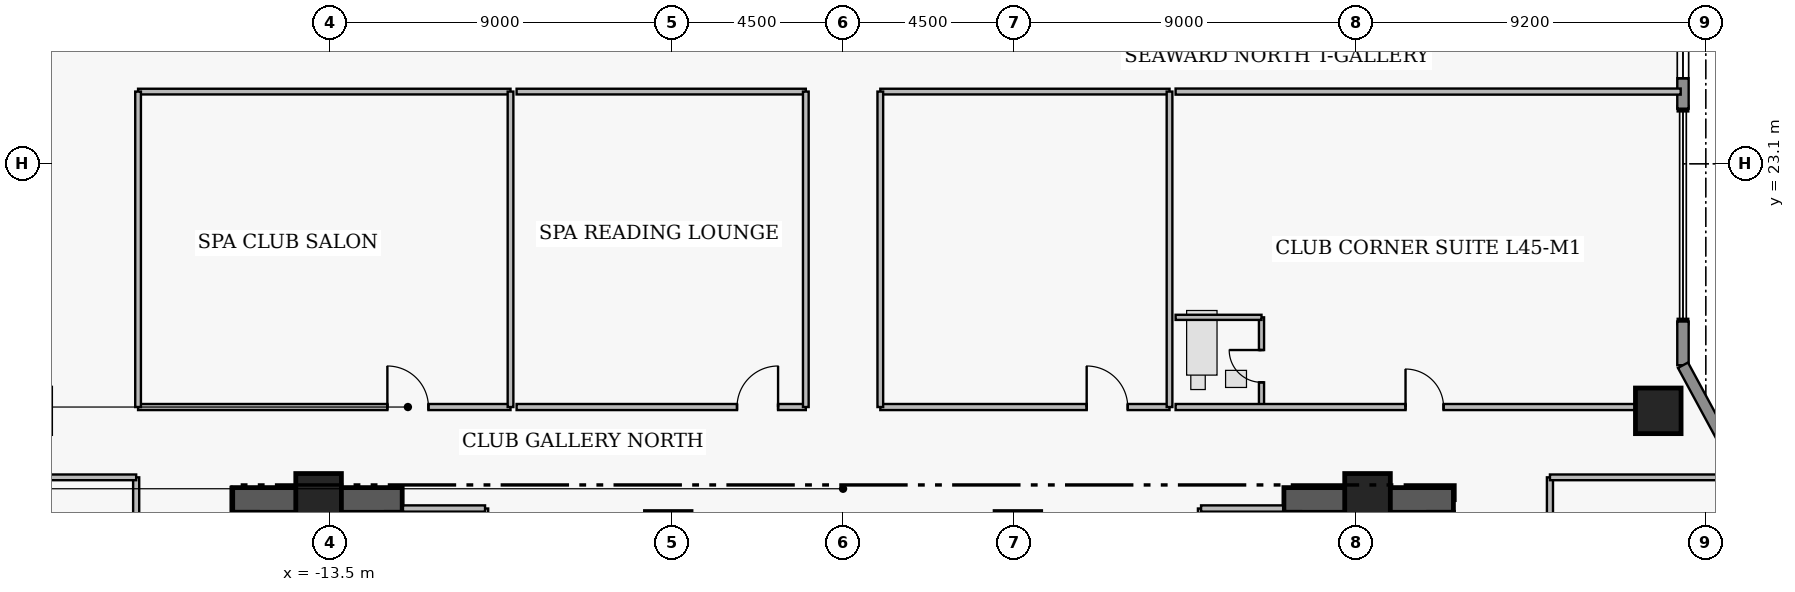
"""IFC4 building model, lengths in metres.
Left out: names, types, materials, properties, quantities, classifications, styles, units other than length and angle.
Written with IfcOpenShell. Run it as: python <this file> out.ifc"""

import sys

from ifc_helpers import new_model, si_unit, direction, frame, frame_2d, origin, origin_2d, place, context, subcontext, project, spatial, rectangle, extrude, element, fill, save


model = new_model("IFC4")
c1 = context("Model", 3, precision=1e-05, world=origin(), true_north=direction((0.0, 1.0)))
c2 = subcontext(c1, "Body", "Model", "MODEL_VIEW")
j1 = project(units=[si_unit("LENGTHUNIT", "METRE"), si_unit("PLANEANGLEUNIT", "RADIAN")], contexts=[c1])
p1 = place(None, origin())
s1 = spatial("IfcSite", under=j1, at=p1, CompositionType="ELEMENT")
p2 = place(p1, origin())
s2 = spatial("IfcBuilding", under=s1, at=p2, CompositionType="ELEMENT")
p3 = place(p2, frame((0.0, 0.0, 181.15)))
s3 = spatial("IfcBuildingStorey", under=s2, at=p3, CompositionType="ELEMENT", Elevation=181.15)
for number, where, z_axis, x_axis in (
    (1, (-16.06, 14.255, 0.0), (0.0, 0.0, 1.0), (1.0, 0.0, 0.0)),
    (2, (11.6, 14.255, 0.0), (0.0, 0.0, 1.0), (1.0, 0.0, 0.0)),
):
    element("IfcWall", number, at=place(p3, frame(where, z_axis=z_axis, x_axis=x_axis)), inside=s3, PredefinedType="SHEAR", context=c2, shape_type="SweptSolid", body=[
        extrude(rectangle(XDim=4.46, YDim=0.65, at=frame_2d((2.23, 0.0))), origin(), (0.0, 0.0, 1.0), 3.56),
    ])
for number, where, z_axis, x_axis in (
    (3, (-13.8, 14.35, 0.0), (0.0, 0.0, 1.0), (1.0, 0.0, 0.0)),
    (4, (-4.6, 13.35, 0.0), (0.0, 0.0, 1.0), (1.0, 0.0, 0.0)),
    (5, (4.6, 13.35, 0.0), (0.0, 0.0, 1.0), (1.0, 0.0, 0.0)),
    (6, (13.8, 14.35, 0.0), (0.0, 0.0, 1.0), (1.0, 0.0, 0.0)),
    (7, (21.45, 16.6, 0.0), (0.0, 0.0, 1.0), (1.0, 0.0, 0.0)),
):
    element("IfcColumn", number, at=place(p3, frame(where, z_axis=z_axis, x_axis=x_axis)), inside=s3, PredefinedType="COLUMN", context=c2, shape_type="SweptSolid", body=[
        extrude(rectangle(XDim=1.2, YDim=1.2, at=origin_2d()), origin(), (0.0, 0.0, 1.0), 3.75),
    ])
p4 = place(p3, frame((22.1, 30.2, 0.0), z_axis=(0.0, 0.0, 1.0), x_axis=(0.0, -1.0, 0.0)))
e8 = element("IfcWall", 8, at=p4, inside=s3, PredefinedType="STANDARD", context=c2, shape_type="SweptSolid", body=[
    extrude(rectangle(XDim=5.65, YDim=0.3, at=frame_2d((2.825, 0.0))), origin(), (0.0, 0.0, 1.0), 3.53),
])
p5 = place(p4, frame((0.935, 0.0, 0.85)))
e9 = element("IfcOpeningElement", 9, at=p5, cuts=e8, PredefinedType="OPENING", context=c2, shape_type="SweptSolid", body=[
    extrude(rectangle(XDim=1.6, YDim=1.8, at=frame_2d((0.8, 0.9))), frame((0.0, 0.16, 0.0), z_axis=(0.0, -1.0, 0.0), x_axis=(1.0, 0.0, 0.0)), (0.0, 0.0, 1.0), 0.32),
])
p6 = place(p4, frame((3.7, 0.0, 0.95)))
e10 = element("IfcOpeningElement", 10, at=p6, cuts=e8, PredefinedType="OPENING", context=c2, shape_type="SweptSolid", body=[
    extrude(rectangle(XDim=1.15, YDim=1.55, at=frame_2d((0.575, 0.775))), frame((0.0, 0.16, 0.0), z_axis=(0.0, -1.0, 0.0), x_axis=(1.0, 0.0, 0.0)), (0.0, 0.0, 1.0), 0.32),
])
p7 = place(p3, frame((22.1, 18.95, 0.0), z_axis=(0.0, 0.0, 1.0), x_axis=(0.0, -1.0, 0.0)))
e11 = element("IfcWall", 11, at=p7, inside=s3, PredefinedType="STANDARD", context=c2, shape_type="SweptSolid", body=[
    extrude(rectangle(XDim=1.15, YDim=0.3, at=frame_2d((0.575, 0.0))), origin(), (0.0, 0.0, 1.0), 3.53),
])
p8 = place(p3, frame((22.1, 17.8, 0.0), z_axis=(0.0, 0.0, 1.0), x_axis=(0.476258655584, -0.879305233114, 0.0)))
e12 = element("IfcWall", 12, at=p8, inside=s3, PredefinedType="STANDARD", context=c2, shape_type="SweptSolid", body=[
    extrude(rectangle(XDim=5.459, YDim=0.3, at=frame_2d((2.729, 0.0))), origin(), (0.0, 0.0, 1.0), 3.53),
])
p9 = place(p3, frame((-18.55, 16.7, 0.0), z_axis=(0.0, 0.0, 1.0), x_axis=(1.0, 0.0, 0.0)))
e13 = element("IfcWall", 13, at=p9, inside=s3, PredefinedType="PARTITIONING", context=c2, shape_type="SweptSolid", body=[
    extrude(rectangle(XDim=9.8, YDim=0.16, at=frame_2d((4.9, 0.0))), origin(), (0.0, 0.0, 1.0), 3.124),
])
p10 = place(p9, frame((6.56, 0.0, 0.0)))
e14 = element("IfcOpeningElement", 14, at=p10, cuts=e13, PredefinedType="OPENING", context=c2, shape_type="SweptSolid", body=[
    extrude(rectangle(XDim=1.08, YDim=2.18, at=frame_2d((0.54, 1.09))), frame((0.0, 0.09, 0.0), z_axis=(0.0, -1.0, 0.0), x_axis=(1.0, 0.0, 0.0)), (0.0, 0.0, 1.0), 0.18),
])
p11 = place(p3, frame((-8.59, 16.7, 0.0), z_axis=(0.0, 0.0, 1.0), x_axis=(1.0, 0.0, 0.0)))
e15 = element("IfcWall", 15, at=p11, inside=s3, PredefinedType="PARTITIONING", context=c2, shape_type="SweptSolid", body=[
    extrude(rectangle(XDim=7.61, YDim=0.16, at=frame_2d((3.805, 0.0))), origin(), (0.0, 0.0, 1.0), 3.124),
])
p12 = place(p11, frame((5.8, 0.0, 0.0)))
e16 = element("IfcOpeningElement", 16, at=p12, cuts=e15, PredefinedType="OPENING", context=c2, shape_type="SweptSolid", body=[
    extrude(rectangle(XDim=1.08, YDim=2.18, at=frame_2d((0.54, 1.09))), frame((0.0, 0.09, 0.0), z_axis=(0.0, -1.0, 0.0), x_axis=(1.0, 0.0, 0.0)), (0.0, 0.0, 1.0), 0.18),
])
p13 = place(p3, frame((0.98, 16.7, 0.0), z_axis=(0.0, 0.0, 1.0), x_axis=(1.0, 0.0, 0.0)))
e17 = element("IfcWall", 17, at=p13, inside=s3, PredefinedType="PARTITIONING", context=c2, shape_type="SweptSolid", body=[
    extrude(rectangle(XDim=7.61, YDim=0.16, at=frame_2d((3.805, 0.0))), origin(), (0.0, 0.0, 1.0), 3.124),
])
p14 = place(p13, frame((5.43, 0.0, 0.0)))
e18 = element("IfcOpeningElement", 18, at=p14, cuts=e17, PredefinedType="OPENING", context=c2, shape_type="SweptSolid", body=[
    extrude(rectangle(XDim=1.08, YDim=2.18, at=frame_2d((0.54, 1.09))), frame((0.0, 0.09, 0.0), z_axis=(0.0, -1.0, 0.0), x_axis=(1.0, 0.0, 0.0)), (0.0, 0.0, 1.0), 0.18),
])
p15 = place(p3, frame((11.01, 16.7, 0.0), z_axis=(0.0, 0.0, 1.0), x_axis=(0.0, 1.0, 0.0)))
e19 = element("IfcWall", 19, at=p15, inside=s3, PredefinedType="PLUMBINGWALL", context=c2, shape_type="SweptSolid", body=[
    extrude(rectangle(XDim=2.36, YDim=0.135, at=frame_2d((1.18, 0.0))), origin(), (0.0, 0.0, 1.0), 3.53),
])
p16 = place(p15, frame((0.65, 0.0, 0.0)))
e20 = element("IfcOpeningElement", 20, at=p16, cuts=e19, PredefinedType="OPENING", context=c2, shape_type="SweptSolid", body=[
    extrude(rectangle(XDim=0.85, YDim=2.1, at=frame_2d((0.425, 1.05))), frame((0.0, 0.077, 0.0), z_axis=(0.0, -1.0, 0.0), x_axis=(1.0, 0.0, 0.0)), (0.0, 0.0, 1.0), 0.155),
])
p17 = place(p3, frame((8.75, 16.7, 0.0), z_axis=(0.0, 0.0, 1.0), x_axis=(1.0, 0.0, 0.0)))
e21 = element("IfcWall", 21, at=p17, inside=s3, PredefinedType="PARTITIONING", context=c2, shape_type="SweptSolid", body=[
    extrude(rectangle(XDim=13.29, YDim=0.16, at=frame_2d((6.645, 0.0))), origin(), (0.0, 0.0, 1.0), 3.124),
])
p18 = place(p17, frame((6.05, 0.0, 0.0)))
e22 = element("IfcOpeningElement", 22, at=p18, cuts=e21, PredefinedType="OPENING", context=c2, shape_type="SweptSolid", body=[
    extrude(rectangle(XDim=1.0, YDim=2.15, at=frame_2d((0.5, 1.075))), frame((0.0, 0.09, 0.0), z_axis=(0.0, -1.0, 0.0), x_axis=(1.0, 0.0, 0.0)), (0.0, 0.0, 1.0), 0.18),
])
p19 = place(p3, frame((18.6, 7.96, 0.0), z_axis=(0.0, 0.0, 1.0), x_axis=(0.0, 1.0, 0.0)))
e23 = element("IfcWall", 23, at=p19, inside=s3, PredefinedType="PARTITIONING", context=c2, shape_type="SweptSolid", body=[
    extrude(rectangle(XDim=6.89, YDim=0.16, at=frame_2d((3.445, 0.0))), origin(), (0.0, 0.0, 1.0), 3.53),
])
p20 = place(p19, frame((2.985, 0.0, 0.0)))
e24 = element("IfcOpeningElement", 24, at=p20, cuts=e23, PredefinedType="OPENING", context=c2, shape_type="SweptSolid", body=[
    extrude(rectangle(XDim=0.92, YDim=2.12, at=frame_2d((0.46, 1.06))), frame((0.0, 0.09, 0.0), z_axis=(0.0, -1.0, 0.0), x_axis=(1.0, 0.0, 0.0)), (0.0, 0.0, 1.0), 0.18),
])
p21 = place(p3, frame((-18.6, 1.55, 0.0), z_axis=(0.0, 0.0, 1.0), x_axis=(0.0, 1.0, 0.0)))
e25 = element("IfcWall", 25, at=p21, inside=s3, PredefinedType="PARTITIONING", context=c2, shape_type="SweptSolid", body=[
    extrude(rectangle(XDim=13.3, YDim=0.16, at=frame_2d((6.65, 0.0))), origin(), (0.0, 0.0, 1.0), 3.53),
])
p22 = place(p21, frame((6.175, 0.0, 0.0)))
e26 = element("IfcOpeningElement", 26, at=p22, cuts=e25, PredefinedType="OPENING", context=c2, shape_type="SweptSolid", body=[
    extrude(rectangle(XDim=0.95, YDim=2.15, at=frame_2d((0.475, 1.075))), frame((0.0, 0.09, 0.0), z_axis=(0.0, -1.0, 0.0), x_axis=(1.0, 0.0, 0.0)), (0.0, 0.0, 1.0), 0.18),
])
p23 = place(p3, frame((-9.42, 11.07, 0.0), z_axis=(0.0, 0.0, 1.0), x_axis=(0.0, 1.0, 0.0)))
e27 = element("IfcWall", 27, at=p23, inside=s3, PredefinedType="PARTITIONING", context=c2, shape_type="SweptSolid", body=[
    extrude(rectangle(XDim=2.96, YDim=0.165, at=frame_2d((1.48, 0.0))), origin(), (0.0, 0.0, 1.0), 3.53),
])
p24 = place(p3, frame((-11.58, 14.03, 0.0), z_axis=(0.0, 0.0, 1.0), x_axis=(1.0, 0.0, 0.0)))
e28 = element("IfcWall", 28, at=p24, inside=s3, PredefinedType="PARTITIONING", context=c2, shape_type="SweptSolid", body=[
    extrude(rectangle(XDim=2.16, YDim=0.165, at=frame_2d((1.08, 0.0))), origin(), (0.0, 0.0, 1.0), 3.53),
])
p25 = place(p3, frame((9.42, 11.07, 0.0), z_axis=(0.0, 0.0, 1.0), x_axis=(0.0, 1.0, 0.0)))
e29 = element("IfcWall", 29, at=p25, inside=s3, PredefinedType="PARTITIONING", context=c2, shape_type="SweptSolid", body=[
    extrude(rectangle(XDim=2.96, YDim=0.165, at=frame_2d((1.48, 0.0))), origin(), (0.0, 0.0, 1.0), 3.53),
])
p26 = place(p3, frame((9.42, 14.03, 0.0), z_axis=(0.0, 0.0, 1.0), x_axis=(1.0, 0.0, 0.0)))
e30 = element("IfcWall", 30, at=p26, inside=s3, PredefinedType="PARTITIONING", context=c2, shape_type="SweptSolid", body=[
    extrude(rectangle(XDim=2.16, YDim=0.165, at=frame_2d((1.08, 0.0))), origin(), (0.0, 0.0, 1.0), 3.53),
])
p27 = place(p3, frame((-18.55, 25.0, 0.0), z_axis=(0.0, 0.0, 1.0), x_axis=(1.0, 0.0, 0.0)))
e31 = element("IfcWall", 31, at=p27, inside=s3, PredefinedType="PARTITIONING", context=c2, shape_type="SweptSolid", body=[
    extrude(rectangle(XDim=9.8, YDim=0.15, at=frame_2d((4.9, 0.0))), origin(), (0.0, 0.0, 1.0), 3.124),
])
for number, where, z_axis, x_axis in (
    (32, (-18.55, 16.7, 0.0), (0.0, 0.0, 1.0), (0.0, 1.0, 0.0)),
    (33, (-8.75, 16.7, 0.0), (0.0, 0.0, 1.0), (0.0, 1.0, 0.0)),
):
    element("IfcWall", number, at=place(p3, frame(where, z_axis=z_axis, x_axis=x_axis)), inside=s3, PredefinedType="PARTITIONING", context=c2, shape_type="SweptSolid", body=[
        extrude(rectangle(XDim=8.3, YDim=0.15, at=frame_2d((4.15, 0.0))), origin(), (0.0, 0.0, 1.0), 3.53),
    ])
p28 = place(p3, frame((-8.59, 25.0, 0.0), z_axis=(0.0, 0.0, 1.0), x_axis=(1.0, 0.0, 0.0)))
e34 = element("IfcWall", 34, at=p28, inside=s3, PredefinedType="PARTITIONING", context=c2, shape_type="SweptSolid", body=[
    extrude(rectangle(XDim=7.61, YDim=0.15, at=frame_2d((3.805, 0.0))), origin(), (0.0, 0.0, 1.0), 3.124),
])
p29 = place(p3, frame((-0.98, 16.7, 0.0), z_axis=(0.0, 0.0, 1.0), x_axis=(0.0, 1.0, 0.0)))
e35 = element("IfcWall", 35, at=p29, inside=s3, PredefinedType="PARTITIONING", context=c2, shape_type="SweptSolid", body=[
    extrude(rectangle(XDim=8.3, YDim=0.15, at=frame_2d((4.15, 0.0))), origin(), (0.0, 0.0, 1.0), 3.53),
])
p30 = place(p3, frame((0.98, 25.0, 0.0), z_axis=(0.0, 0.0, 1.0), x_axis=(1.0, 0.0, 0.0)))
e36 = element("IfcWall", 36, at=p30, inside=s3, PredefinedType="PARTITIONING", context=c2, shape_type="SweptSolid", body=[
    extrude(rectangle(XDim=7.61, YDim=0.15, at=frame_2d((3.805, 0.0))), origin(), (0.0, 0.0, 1.0), 3.124),
])
for number, where, z_axis, x_axis in (
    (37, (0.98, 16.7, 0.0), (0.0, 0.0, 1.0), (0.0, 1.0, 0.0)),
    (38, (8.59, 16.7, 0.0), (0.0, 0.0, 1.0), (0.0, 1.0, 0.0)),
):
    element("IfcWall", number, at=place(p3, frame(where, z_axis=z_axis, x_axis=x_axis)), inside=s3, PredefinedType="PARTITIONING", context=c2, shape_type="SweptSolid", body=[
        extrude(rectangle(XDim=8.3, YDim=0.15, at=frame_2d((4.15, 0.0))), origin(), (0.0, 0.0, 1.0), 3.53),
    ])
p31 = place(p3, frame((8.75, 19.06, 0.0), z_axis=(0.0, 0.0, 1.0), x_axis=(1.0, 0.0, 0.0)))
e39 = element("IfcWall", 39, at=p31, inside=s3, PredefinedType="PLUMBINGWALL", context=c2, shape_type="SweptSolid", body=[
    extrude(rectangle(XDim=2.26, YDim=0.135, at=frame_2d((1.13, 0.0))), origin(), (0.0, 0.0, 1.0), 3.124),
])
p32 = place(p3, frame((8.75, 25.0, 0.0), z_axis=(0.0, 0.0, 1.0), x_axis=(1.0, 0.0, 0.0)))
e40 = element("IfcWall", 40, at=p32, inside=s3, PredefinedType="PARTITIONING", context=c2, shape_type="SweptSolid", body=[
    extrude(rectangle(XDim=13.29, YDim=0.16, at=frame_2d((6.645, 0.0))), origin(), (0.0, 0.0, 1.0), 3.124),
])
for number, where, z_axis, x_axis in (
    (41, (18.6, 14.85, 0.0), (0.0, 0.0, 1.0), (1.0, 0.0, 0.0)),
    (42, (-23.638, 14.85, 0.0), (0.0, 0.0, 1.0), (1.0, 0.0, 0.0)),
):
    element("IfcWall", number, at=place(p3, frame(where, z_axis=z_axis, x_axis=x_axis)), inside=s3, PredefinedType="PARTITIONING", context=c2, shape_type="SweptSolid", body=[
        extrude(rectangle(XDim=5.038, YDim=0.15, at=frame_2d((2.519, 0.0))), origin(), (0.0, 0.0, 1.0), 3.53),
    ])
p33 = place(p6, origin())
e43 = element("IfcWindow", 43, at=p33, inside=s3, PartitioningType="SINGLE_PANEL", PredefinedType="WINDOW", context=c2, shape_type="SweptSolid", body=[
    extrude(rectangle(XDim=1.15, YDim=1.55, at=frame_2d((0.575, 0.775))), frame((0.0, 0.03, 0.0), z_axis=(0.0, -1.0, 0.0), x_axis=(1.0, 0.0, 0.0)), (0.0, 0.0, 1.0), 0.06),
])
fill(e10, e43)
p34 = place(p10, origin())
e44 = element("IfcDoor", 44, at=p34, inside=s3, OperationType="SINGLE_SWING_LEFT", PredefinedType="DOOR", context=c2, shape_type="SweptSolid", body=[
    extrude(rectangle(XDim=1.08, YDim=2.18, at=frame_2d((0.54, 1.09))), frame((0.0, 0.025, 0.0), z_axis=(0.0, -1.0, 0.0), x_axis=(1.0, 0.0, 0.0)), (0.0, 0.0, 1.0), 0.05),
])
fill(e14, e44)
p35 = place(p12, origin())
e45 = element("IfcDoor", 45, at=p35, inside=s3, OperationType="SINGLE_SWING_RIGHT", PredefinedType="DOOR", context=c2, shape_type="SweptSolid", body=[
    extrude(rectangle(XDim=1.08, YDim=2.18, at=frame_2d((0.54, 1.09))), frame((0.0, 0.025, 0.0), z_axis=(0.0, -1.0, 0.0), x_axis=(1.0, 0.0, 0.0)), (0.0, 0.0, 1.0), 0.05),
])
fill(e16, e45)
p36 = place(p14, origin())
e46 = element("IfcDoor", 46, at=p36, inside=s3, OperationType="SINGLE_SWING_LEFT", PredefinedType="DOOR", context=c2, shape_type="SweptSolid", body=[
    extrude(rectangle(XDim=1.08, YDim=2.18, at=frame_2d((0.54, 1.09))), frame((0.0, 0.025, 0.0), z_axis=(0.0, -1.0, 0.0), x_axis=(1.0, 0.0, 0.0)), (0.0, 0.0, 1.0), 0.05),
])
fill(e18, e46)
p37 = place(p16, origin())
e47 = element("IfcDoor", 47, at=p37, inside=s3, OperationType="SINGLE_SWING_RIGHT", PredefinedType="DOOR", context=c2, shape_type="SweptSolid", body=[
    extrude(rectangle(XDim=0.85, YDim=2.1, at=frame_2d((0.425, 1.05))), frame((0.0, 0.025, 0.0), z_axis=(0.0, -1.0, 0.0), x_axis=(1.0, 0.0, 0.0)), (0.0, 0.0, 1.0), 0.05),
])
fill(e20, e47)
p38 = place(p18, origin())
e48 = element("IfcDoor", 48, at=p38, inside=s3, OperationType="SINGLE_SWING_LEFT", PredefinedType="DOOR", context=c2, shape_type="SweptSolid", body=[
    extrude(rectangle(XDim=1.0, YDim=2.15, at=frame_2d((0.5, 1.075))), frame((0.0, 0.025, 0.0), z_axis=(0.0, -1.0, 0.0), x_axis=(1.0, 0.0, 0.0)), (0.0, 0.0, 1.0), 0.05),
])
fill(e22, e48)
save(model, sys.argv[1])
